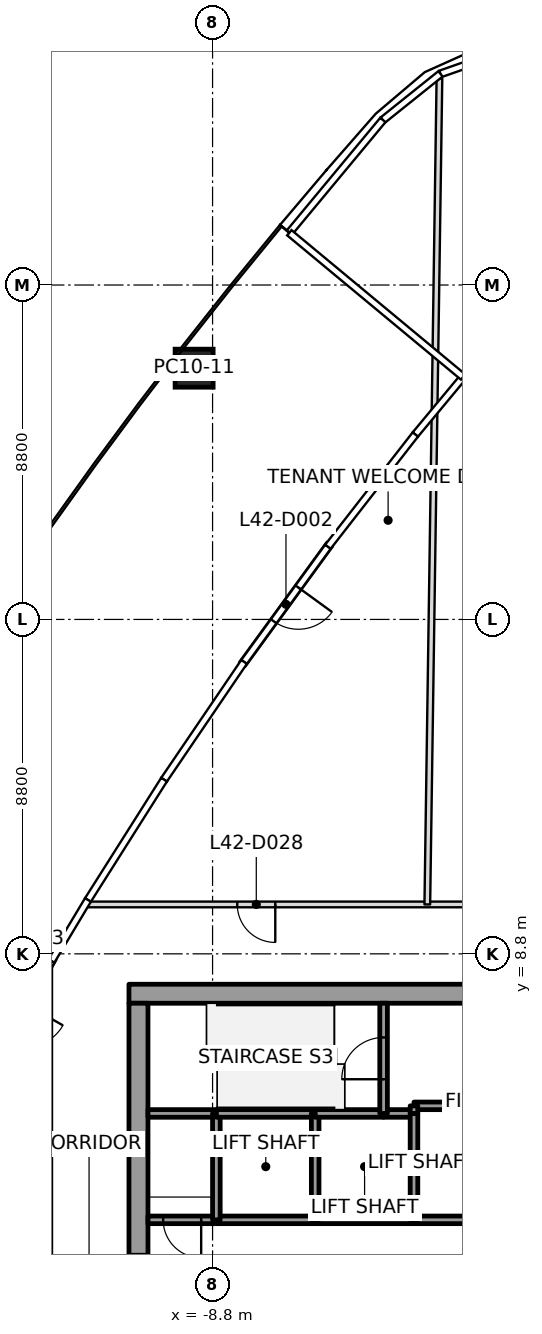
"""IFC4 building model, lengths in metres.
Left out: names, types, materials, properties, quantities, classifications, styles, units other than length and angle.
Written with IfcOpenShell. Run it as: python <this file> out.ifc"""

import sys

from ifc_helpers import new_model, si_unit, direction, frame, frame_2d, origin, origin_2d, place, context, subcontext, project, spatial, rectangle, extrude, element, fill, save


model = new_model("IFC4")
c1 = context("Model", 3, precision=1e-05, world=origin(), true_north=direction((0.0, 1.0)))
c2 = subcontext(c1, "Body", "Model", "MODEL_VIEW")
j1 = project(units=[si_unit("LENGTHUNIT", "METRE"), si_unit("PLANEANGLEUNIT", "RADIAN")], contexts=[c1])
p1 = place(None, origin())
s1 = spatial("IfcSite", under=j1, at=p1, CompositionType="ELEMENT")
p2 = place(p1, origin())
s2 = spatial("IfcBuilding", under=s1, at=p2, CompositionType="ELEMENT")
p3 = place(p2, frame((0.0, 0.0, 189.8)))
s3 = spatial("IfcBuildingStorey", under=s2, at=p3, CompositionType="ELEMENT", Elevation=189.8)
p4 = place(p3, frame((-9.286, 24.211, 0.0), z_axis=(0.000183067202, -0.020442504242, 0.999791013416), x_axis=(0.612322145425, 0.790445437443, 0.016049942328)))
e1 = element("IfcColumn", 1, at=p4, inside=s3, PredefinedType="COLUMN", context=c2, shape_type="SweptSolid", body=[
    extrude(rectangle(XDim=1.0, YDim=1.0, at=origin_2d()), origin(), (0.0, 0.0, 1.0), 4.001),
])
p5 = place(p3, frame((-11.0, 7.75, 0.0), z_axis=(0.0, 0.0, 1.0), x_axis=(1.0, 0.0, 0.0)))
e2 = element("IfcWall", 2, at=p5, inside=s3, PredefinedType="SHEAR", context=c2, shape_type="SweptSolid", body=[
    extrude(rectangle(XDim=22.0, YDim=0.5, at=frame_2d((11.0, 0.0))), origin(), (0.0, 0.0, 1.0), 4.0),
])
p6 = place(p5, frame((10.45, 0.0, 0.0)))
e3 = element("IfcOpeningElement", 3, at=p6, cuts=e2, PredefinedType="OPENING", context=c2, shape_type="SweptSolid", body=[
    extrude(rectangle(XDim=1.1, YDim=2.1, at=frame_2d((0.55, 1.05))), frame((0.0, 0.25, 0.0), z_axis=(0.0, -1.0, 0.0), x_axis=(1.0, 0.0, 0.0)), (0.0, 0.0, 1.0), 0.5),
])
p7 = place(p3, frame((-10.75, -7.5, 0.0), z_axis=(0.0, 0.0, 1.0), x_axis=(0.0, 1.0, 0.0)))
e4 = element("IfcWall", 4, at=p7, inside=s3, PredefinedType="SHEAR", context=c2, shape_type="SweptSolid", body=[
    extrude(rectangle(XDim=15.0, YDim=0.5, at=frame_2d((7.5, 0.0))), origin(), (0.0, 0.0, 1.0), 4.0),
])
p8 = place(p7, frame((6.6, 0.0, 0.0)))
e5 = element("IfcOpeningElement", 5, at=p8, cuts=e4, PredefinedType="OPENING", context=c2, shape_type="SweptSolid", body=[
    extrude(rectangle(XDim=1.8, YDim=2.1, at=frame_2d((0.9, 1.05))), frame((0.0, 0.25, 0.0), z_axis=(0.0, -1.0, 0.0), x_axis=(1.0, 0.0, 0.0)), (0.0, 0.0, 1.0), 0.5),
])
p9 = place(p3, frame((-5.713, 19.584, 0.0), z_axis=(0.0, 0.0, 1.0), x_axis=(-0.58849701682, -0.808499388493, 0.0)))
e6 = element("IfcWall", 6, at=p9, inside=s3, PredefinedType="SOLIDWALL", context=c2, shape_type="SweptSolid", body=[
    extrude(rectangle(XDim=3.926, YDim=0.2, at=frame_2d((1.963, 0.0))), origin(), (0.0, 0.0, 1.0), 3.317),
])
p10 = place(p9, frame((1.413, 0.0, 0.0)))
e7 = element("IfcOpeningElement", 7, at=p10, cuts=e6, PredefinedType="OPENING", context=c2, shape_type="SweptSolid", body=[
    extrude(rectangle(XDim=1.1, YDim=2.1, at=frame_2d((0.55, 1.05))), frame((0.0, 0.1, 0.0), z_axis=(0.0, -1.0, 0.0), x_axis=(1.0, 0.0, 0.0)), (0.0, 0.0, 1.0), 0.2),
])
p11 = place(p3, frame((-12.998, 8.689, 0.0), z_axis=(0.0, 0.0, 1.0), x_axis=(-0.492974917458, -0.870043522335, 0.0)))
e8 = element("IfcWall", 8, at=p11, inside=s3, PredefinedType="SOLIDWALL", context=c2, shape_type="SweptSolid", body=[
    extrude(rectangle(XDim=3.926, YDim=0.2, at=frame_2d((1.963, 0.0))), origin(), (0.0, 0.0, 1.0), 3.34),
])
p12 = place(p11, frame((1.413, 0.0, 0.0)))
e9 = element("IfcOpeningElement", 9, at=p12, cuts=e8, PredefinedType="OPENING", context=c2, shape_type="SweptSolid", body=[
    extrude(rectangle(XDim=1.1, YDim=2.1, at=frame_2d((0.55, 1.05))), frame((0.0, 0.1, 0.0), z_axis=(0.0, -1.0, 0.0), x_axis=(1.0, 0.0, 0.0)), (0.0, 0.0, 1.0), 0.2),
])
p13 = place(p3, frame((-8.7, 1.8, 0.0), z_axis=(0.0, 0.0, 1.0), x_axis=(-1.0, 0.0, 0.0)))
e10 = element("IfcWall", 10, at=p13, inside=s3, PredefinedType="SOLIDWALL", context=c2, shape_type="SweptSolid", body=[
    extrude(rectangle(XDim=1.8, YDim=0.2, at=frame_2d((0.9, 0.0))), origin(), (0.0, 0.0, 1.0), 3.85),
])
p14 = place(p13, frame((0.4, 0.0, 0.0)))
e11 = element("IfcOpeningElement", 11, at=p14, cuts=e10, PredefinedType="OPENING", context=c2, shape_type="SweptSolid", body=[
    extrude(rectangle(XDim=1.0, YDim=2.1, at=frame_2d((0.5, 1.05))), frame((0.0, 0.1, 0.0), z_axis=(0.0, -1.0, 0.0), x_axis=(1.0, 0.0, 0.0)), (0.0, 0.0, 1.0), 0.2),
])
p15 = place(p3, frame((-8.7, 4.6, 0.0), z_axis=(0.0, 0.0, 1.0), x_axis=(-1.0, 0.0, 0.0)))
e12 = element("IfcWall", 12, at=p15, inside=s3, PredefinedType="SOLIDWALL", context=c2, shape_type="SweptSolid", body=[
    extrude(rectangle(XDim=1.8, YDim=0.2, at=frame_2d((0.9, 0.0))), origin(), (0.0, 0.0, 1.0), 3.85),
])
p16 = place(p3, frame((-6.1, 1.8, 0.0), z_axis=(0.0, 0.0, 1.0), x_axis=(-1.0, 0.0, 0.0)))
e13 = element("IfcWall", 13, at=p16, inside=s3, PredefinedType="SOLIDWALL", context=c2, shape_type="SweptSolid", body=[
    extrude(rectangle(XDim=2.6, YDim=0.2, at=frame_2d((1.3, 0.0))), origin(), (0.0, 0.0, 1.0), 3.85),
])
p17 = place(p3, frame((-8.7, 1.8, 0.0), z_axis=(0.0, 0.0, 1.0), x_axis=(0.0, 1.0, 0.0)))
e14 = element("IfcWall", 14, at=p17, inside=s3, PredefinedType="SOLIDWALL", context=c2, shape_type="SweptSolid", body=[
    extrude(rectangle(XDim=2.8, YDim=0.2, at=frame_2d((1.4, 0.0))), origin(), (0.0, 0.0, 1.0), 3.85),
])
p18 = place(p3, frame((-6.1, 4.6, 0.0), z_axis=(0.0, 0.0, 1.0), x_axis=(-1.0, 0.0, 0.0)))
e15 = element("IfcWall", 15, at=p18, inside=s3, PredefinedType="SOLIDWALL", context=c2, shape_type="SweptSolid", body=[
    extrude(rectangle(XDim=2.6, YDim=0.2, at=frame_2d((1.3, 0.0))), origin(), (0.0, 0.0, 1.0), 3.85),
])
p19 = place(p3, frame((-3.5, 1.8, 0.0), z_axis=(0.0, 0.0, 1.0), x_axis=(-1.0, 0.0, 0.0)))
e16 = element("IfcWall", 16, at=p19, inside=s3, PredefinedType="SOLIDWALL", context=c2, shape_type="SweptSolid", body=[
    extrude(rectangle(XDim=2.6, YDim=0.2, at=frame_2d((1.3, 0.0))), origin(), (0.0, 0.0, 1.0), 3.85),
])
p20 = place(p3, frame((-6.1, 1.8, 0.0), z_axis=(0.0, 0.0, 1.0), x_axis=(0.0, 1.0, 0.0)))
e17 = element("IfcWall", 17, at=p20, inside=s3, PredefinedType="SOLIDWALL", context=c2, shape_type="SweptSolid", body=[
    extrude(rectangle(XDim=2.8, YDim=0.2, at=frame_2d((1.4, 0.0))), origin(), (0.0, 0.0, 1.0), 3.85),
])
p21 = place(p3, frame((-4.3, 4.6, 0.0), z_axis=(0.0, 0.0, 1.0), x_axis=(-1.0, 0.0, 0.0)))
e18 = element("IfcWall", 18, at=p21, inside=s3, PredefinedType="SOLIDWALL", context=c2, shape_type="SweptSolid", body=[
    extrude(rectangle(XDim=1.8, YDim=0.2, at=frame_2d((0.9, 0.0))), origin(), (0.0, 0.0, 1.0), 3.85),
])
p22 = place(p3, frame((-3.5, 4.6, 0.0), z_axis=(0.0, 0.0, 1.0), x_axis=(-1.0, 0.0, 0.0)))
e19 = element("IfcWall", 19, at=p22, inside=s3, PredefinedType="SOLIDWALL", context=c2, shape_type="SweptSolid", body=[
    extrude(rectangle(XDim=0.8, YDim=0.2, at=frame_2d((0.4, 0.0))), origin(), (0.0, 0.0, 1.0), 3.85),
])
p23 = place(p3, frame((-4.3, 4.6, 0.0), z_axis=(0.0, 0.0, 1.0), x_axis=(0.0, 1.0, 0.0)))
e20 = element("IfcWall", 20, at=p23, inside=s3, PredefinedType="SOLIDWALL", context=c2, shape_type="SweptSolid", body=[
    extrude(rectangle(XDim=2.9, YDim=0.2, at=frame_2d((1.45, 0.0))), origin(), (0.0, 0.0, 1.0), 3.85),
])
p24 = place(p23, frame((0.9, 0.0, 0.0)))
e21 = element("IfcOpeningElement", 21, at=p24, cuts=e20, PredefinedType="OPENING", context=c2, shape_type="SweptSolid", body=[
    extrude(rectangle(XDim=1.1, YDim=2.1, at=frame_2d((0.55, 1.05))), frame((0.0, 0.1, 0.0), z_axis=(0.0, -1.0, 0.0), x_axis=(1.0, 0.0, 0.0)), (0.0, 0.0, 1.0), 0.2),
])
p25 = place(p3, frame((-0.9, 1.8, 0.0), z_axis=(0.0, 0.0, 1.0), x_axis=(-1.0, 0.0, 0.0)))
e22 = element("IfcWall", 22, at=p25, inside=s3, PredefinedType="SOLIDWALL", context=c2, shape_type="SweptSolid", body=[
    extrude(rectangle(XDim=2.6, YDim=0.2, at=frame_2d((1.3, 0.0))), origin(), (0.0, 0.0, 1.0), 3.85),
])
p26 = place(p3, frame((-3.5, 4.6, 0.0), z_axis=(0.0, 0.0, 1.0), x_axis=(0.0, -1.0, 0.0)))
e23 = element("IfcWall", 23, at=p26, inside=s3, PredefinedType="SOLIDWALL", context=c2, shape_type="SweptSolid", body=[
    extrude(rectangle(XDim=2.8, YDim=0.2, at=frame_2d((1.4, 0.0))), origin(), (0.0, 0.0, 1.0), 3.85),
])
p27 = place(p3, frame((-0.9, 4.8, 0.0), z_axis=(0.0, 0.0, 1.0), x_axis=(-1.0, 0.0, 0.0)))
e24 = element("IfcWall", 24, at=p27, inside=s3, PredefinedType="SOLIDWALL", context=c2, shape_type="SweptSolid", body=[
    extrude(rectangle(XDim=2.6, YDim=0.2, at=frame_2d((1.3, 0.0))), origin(), (0.0, 0.0, 1.0), 3.85),
])
p28 = place(p3, frame((-3.5, 4.8, 0.0), z_axis=(0.0, 0.0, 1.0), x_axis=(0.0, -1.0, 0.0)))
e25 = element("IfcWall", 25, at=p28, inside=s3, PredefinedType="SOLIDWALL", context=c2, shape_type="SweptSolid", body=[
    extrude(rectangle(XDim=0.2, YDim=0.2, at=frame_2d((0.1, 0.0))), origin(), (0.0, 0.0, 1.0), 3.85),
])
p29 = place(p3, frame((-3.15, 10.1, 0.0), z_axis=(0.0, 0.0, 1.0), x_axis=(0.014702310804, 0.999891915187, 0.0)))
e26 = element("IfcWall", 26, at=p29, inside=s3, PredefinedType="PARTITIONING", context=c2, shape_type="SweptSolid", body=[
    extrude(rectangle(XDim=21.737, YDim=0.15, at=frame_2d((10.868, 0.0))), origin(), (0.0, 0.0, 1.0), 3.234),
])
p30 = place(p3, frame((13.02, 10.1, 0.0), z_axis=(0.0, 0.0, 1.0), x_axis=(-1.0, 0.0, 0.0)))
e27 = element("IfcWall", 27, at=p30, inside=s3, PredefinedType="PARTITIONING", context=c2, shape_type="SweptSolid", body=[
    extrude(rectangle(XDim=25.17, YDim=0.15, at=frame_2d((12.585, 0.0))), origin(), (0.0, 0.0, 1.0), 3.166),
])
p31 = place(p30, frame((0.95, 0.0, 0.0)))
e28 = element("IfcOpeningElement", 28, at=p31, cuts=e27, PredefinedType="OPENING", context=c2, shape_type="SweptSolid", body=[
    extrude(rectangle(XDim=0.9, YDim=2.1, at=frame_2d((0.45, 1.05))), frame((0.0, 0.075, 0.0), z_axis=(0.0, -1.0, 0.0), x_axis=(1.0, 0.0, 0.0)), (0.0, 0.0, 1.0), 0.15),
])
p32 = place(p30, frame((9.085, 0.0, 0.0)))
e29 = element("IfcOpeningElement", 29, at=p32, cuts=e27, PredefinedType="OPENING", context=c2, shape_type="SweptSolid", body=[
    extrude(rectangle(XDim=1.0, YDim=2.1, at=frame_2d((0.5, 1.05))), frame((0.0, 0.075, 0.0), z_axis=(0.0, -1.0, 0.0), x_axis=(1.0, 0.0, 0.0)), (0.0, 0.0, 1.0), 0.15),
])
p33 = place(p30, frame((20.17, 0.0, 0.0)))
e30 = element("IfcOpeningElement", 30, at=p33, cuts=e27, PredefinedType="OPENING", context=c2, shape_type="SweptSolid", body=[
    extrude(rectangle(XDim=1.0, YDim=2.1, at=frame_2d((0.5, 1.05))), frame((0.0, 0.075, 0.0), z_axis=(0.0, -1.0, 0.0), x_axis=(1.0, 0.0, 0.0)), (0.0, 0.0, 1.0), 0.15),
])
p34 = place(p10, origin())
e31 = element("IfcDoor", 31, at=p34, inside=s3, OperationType="SINGLE_SWING_RIGHT", PredefinedType="DOOR", context=c2, shape_type="SweptSolid", body=[
    extrude(rectangle(XDim=1.1, YDim=2.1, at=frame_2d((0.55, 1.05))), frame((0.0, 0.025, 0.0), z_axis=(0.0, -1.0, 0.0), x_axis=(1.0, 0.0, 0.0)), (0.0, 0.0, 1.0), 0.05),
])
fill(e7, e31)
p35 = place(p33, origin())
e32 = element("IfcDoor", 32, at=p35, inside=s3, OperationType="SINGLE_SWING_LEFT", PredefinedType="DOOR", context=c2, shape_type="SweptSolid", body=[
    extrude(rectangle(XDim=1.0, YDim=2.1, at=frame_2d((0.5, 1.05))), frame((0.0, 0.025, 0.0), z_axis=(0.0, -1.0, 0.0), x_axis=(1.0, 0.0, 0.0)), (0.0, 0.0, 1.0), 0.05),
])
fill(e30, e32)
p36 = place(p14, origin())
e33 = element("IfcDoor", 33, at=p36, inside=s3, OperationType="SINGLE_SWING_LEFT", PredefinedType="DOOR", context=c2, shape_type="SweptSolid", body=[
    extrude(rectangle(XDim=1.0, YDim=2.1, at=frame_2d((0.5, 1.05))), frame((0.0, 0.025, 0.0), z_axis=(0.0, -1.0, 0.0), x_axis=(1.0, 0.0, 0.0)), (0.0, 0.0, 1.0), 0.05),
])
fill(e11, e33)
p37 = place(p24, origin())
e34 = element("IfcDoor", 34, at=p37, inside=s3, OperationType="SINGLE_SWING_RIGHT", PredefinedType="DOOR", context=c2, shape_type="SweptSolid", body=[
    extrude(rectangle(XDim=1.1, YDim=2.1, at=frame_2d((0.55, 1.05))), frame((0.0, 0.025, 0.0), z_axis=(0.0, -1.0, 0.0), x_axis=(1.0, 0.0, 0.0)), (0.0, 0.0, 1.0), 0.05),
])
fill(e21, e34)
p38 = place(p8, origin())
e35 = element("IfcDoor", 35, at=p38, inside=s3, OperationType="DOUBLE_DOOR_SINGLE_SWING", PredefinedType="DOOR", context=c2, shape_type="SweptSolid", body=[
    extrude(rectangle(XDim=1.8, YDim=2.1, at=frame_2d((0.9, 1.05))), frame((0.0, 0.025, 0.0), z_axis=(0.0, -1.0, 0.0), x_axis=(1.0, 0.0, 0.0)), (0.0, 0.0, 1.0), 0.05),
])
fill(e5, e35)
save(model, sys.argv[1])
